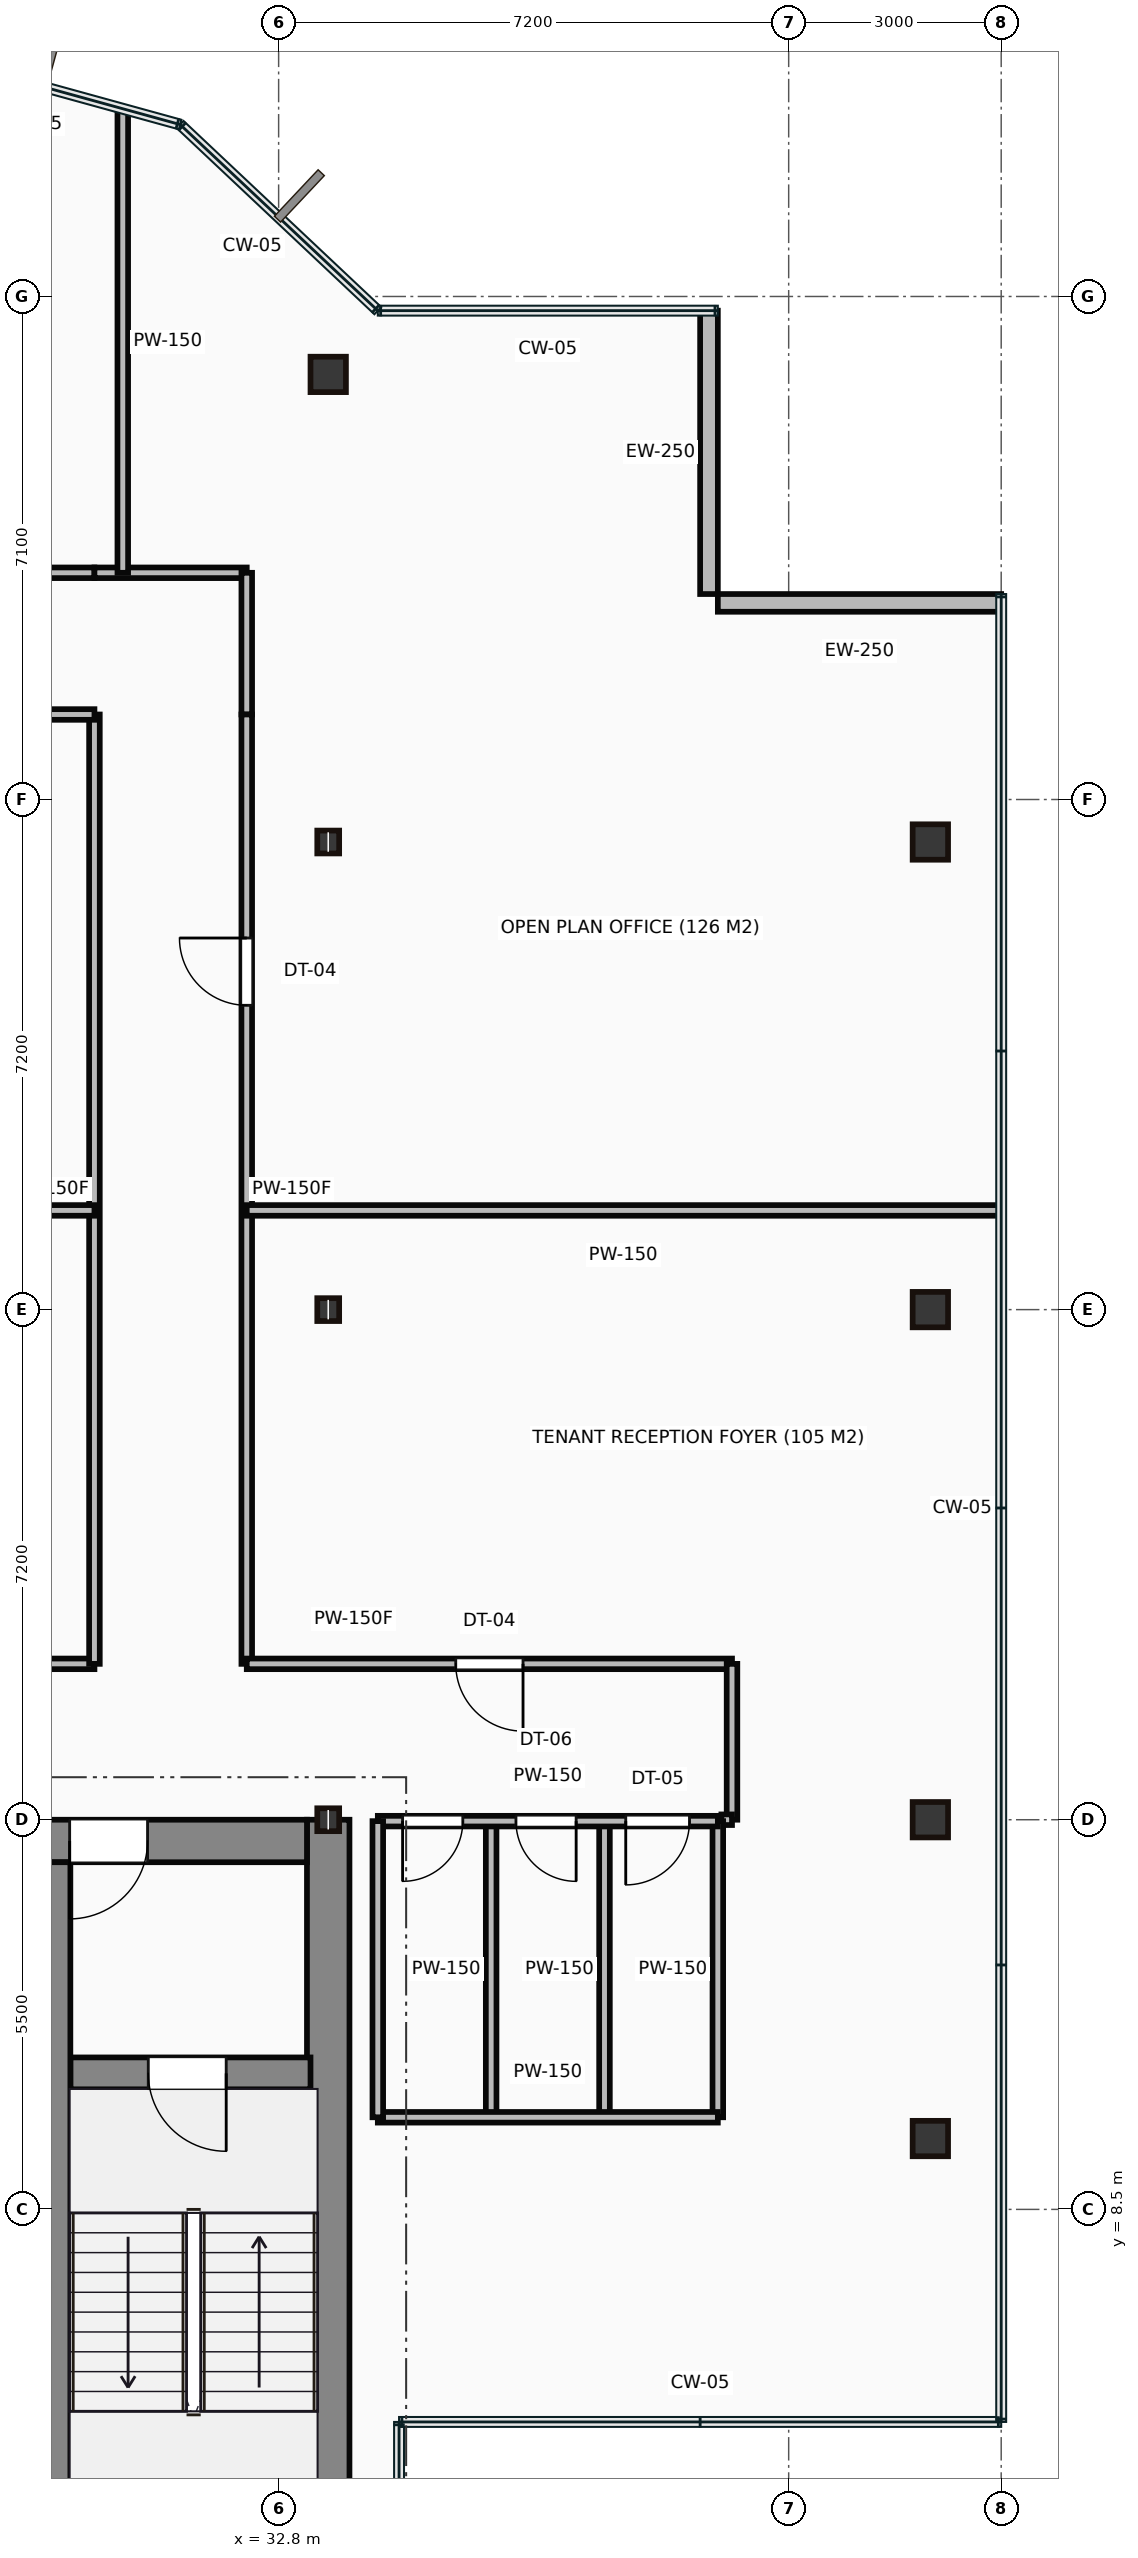
"""IFC4 building model, lengths in metres.
Left out: names, types, materials, properties, quantities, classifications, styles, units other than length and angle.
Written with IfcOpenShell. Run it as: python <this file> out.ifc"""

import sys

from ifc_helpers import new_model, si_unit, direction, frame, frame_2d, origin, origin_2d, place, context, subcontext, project, spatial, rectangle, hollow_rectangle, i_section, extrude, source, transform, mapped, element, fill, save


model = new_model("IFC4")
c1 = context("Model", 3, precision=1e-05, world=origin(), true_north=direction((0.0, 1.0)))
c2 = subcontext(c1, "Body", "Model", "MODEL_VIEW")
j1 = project(units=[si_unit("LENGTHUNIT", "METRE"), si_unit("PLANEANGLEUNIT", "RADIAN")], contexts=[c1])
p1 = place(None, origin())
s1 = spatial("IfcSite", under=j1, at=p1, CompositionType="ELEMENT")
p2 = place(p1, origin())
s2 = spatial("IfcBuilding", under=s1, at=p2, CompositionType="ELEMENT")
p3 = place(p2, frame((0.0, 0.0, 269.75)))
s3 = spatial("IfcBuildingStorey", under=s2, at=p3, CompositionType="ELEMENT", Elevation=269.75)
m1 = source(origin(), c2, "Body", "SweptSolid", [
    extrude(rectangle(XDim=13.1, YDim=0.6, at=frame_2d((6.55, 0.0))), origin(), (0.0, 0.0, 1.0), 3.65),
])
p4 = place(p3, frame((33.5, 0.9, 0.0), z_axis=(0.0, 0.0, 1.0), x_axis=(0.0, 1.0, 0.0)))
e1 = element("IfcWall", 1, at=p4, inside=s3, PredefinedType="SHEAR", context=c2, shape_type="MappedRepresentation", body=[
    mapped(m1, transform((0.0, 0.0, 0.0))),
])
m2 = source(origin(), c2, "Body", "SweptSolid", [
    extrude(rectangle(XDim=12.6, YDim=0.6, at=frame_2d((6.3, 0.0))), origin(), (0.0, 0.0, 1.0), 3.65),
])
p5 = place(p3, frame((20.6, 13.7, 0.0), z_axis=(0.0, 0.0, 1.0), x_axis=(1.0, 0.0, 0.0)))
e2 = element("IfcWall", 2, at=p5, inside=s3, PredefinedType="SHEAR", context=c2, shape_type="MappedRepresentation", body=[
    mapped(m2, transform((0.0, 0.0, 0.0))),
])
p6 = place(p5, frame((9.25, 0.0, 0.0)))
e3 = element("IfcOpeningElement", 3, at=p6, cuts=e2, PredefinedType="OPENING", context=c2, shape_type="SweptSolid", body=[
    extrude(rectangle(XDim=1.1, YDim=2.15, at=frame_2d((0.55, 1.075))), frame((0.0, 0.31, 0.0), z_axis=(0.0, -1.0, 0.0), x_axis=(1.0, 0.0, 0.0)), (0.0, 0.0, 1.0), 0.62),
])
m3 = source(origin(), c2, "Body", "SweptSolid", [
    extrude(rectangle(XDim=12.5, YDim=0.45, at=frame_2d((6.25, 0.0))), origin(), (0.0, 0.0, 1.0), 3.65),
])
p7 = place(p3, frame((29.635, 0.9, 0.0), z_axis=(0.0, 0.0, 1.0), x_axis=(0.0, 1.0, 0.0)))
e4 = element("IfcWall", 4, at=p7, inside=s3, PredefinedType="SHEAR", context=c2, shape_type="MappedRepresentation", body=[
    mapped(m3, transform((0.0, 0.0, 0.0))),
])
m4 = source(origin(), c2, "Body", "SweptSolid", [
    extrude(rectangle(XDim=3.39, YDim=0.45, at=frame_2d((1.695, 0.0))), origin(), (0.0, 0.0, 1.0), 3.65),
])
p8 = place(p3, frame((29.86, 10.42, 0.0), z_axis=(0.0, 0.0, 1.0), x_axis=(1.0, 0.0, 0.0)))
e5 = element("IfcWall", 5, at=p8, inside=s3, PredefinedType="SHEAR", context=c2, shape_type="MappedRepresentation", body=[
    mapped(m4, transform((0.0, 0.0, 0.0))),
])
p9 = place(p8, frame((1.1, 0.0, 0.0)))
e6 = element("IfcOpeningElement", 6, at=p9, cuts=e5, PredefinedType="OPENING", context=c2, shape_type="SweptSolid", body=[
    extrude(rectangle(XDim=1.1, YDim=2.15, at=frame_2d((0.55, 1.075))), frame((0.0, 0.235, 0.0), z_axis=(0.0, -1.0, 0.0), x_axis=(1.0, 0.0, 0.0)), (0.0, 0.0, 1.0), 0.47),
])
m5 = source(origin(), c2, "Body", "SweptSolid", [
    extrude(i_section(OverallWidth=0.309, OverallDepth=0.323, WebThickness=0.014, FlangeThickness=0.023, at=origin_2d()), origin(), (0.0, 0.0, 1.0), 3.65),
])
for number, where, z_axis, x_axis in (
    (7, (33.5, 14.0, 0.0), (0.0, 0.0, 1.0), (1.0, 0.0, 0.0)),
    (8, (33.5, 21.2, 0.0), (0.0, 0.0, 1.0), (1.0, 0.0, 0.0)),
    (9, (33.5, 27.8, 0.0), (0.0, 0.0, 1.0), (1.0, 0.0, 0.0)),
):
    element("IfcColumn", number, at=place(p3, frame(where, z_axis=z_axis, x_axis=x_axis)), inside=s3, PredefinedType="COLUMN", context=c2, shape_type="MappedRepresentation", body=[
        mapped(m5, transform((0.0, 0.0, 0.0))),
    ])
m6 = source(origin(), c2, "Body", "SweptSolid", [
    extrude(hollow_rectangle(XDim=0.5, YDim=0.5, WallThickness=0.022, at=origin_2d()), origin(), (0.0, 0.0, 1.0), 3.65),
])
for number, where, z_axis, x_axis in (
    (10, (33.5, 34.4, 0.0), (0.0, 0.0, 1.0), (1.0, 0.0, 0.0)),
    (11, (42.0, 9.5, 0.0), (0.0, 0.0, 1.0), (1.0, 0.0, 0.0)),
    (12, (42.0, 14.0, 0.0), (0.0, 0.0, 1.0), (1.0, 0.0, 0.0)),
    (13, (42.0, 21.2, 0.0), (0.0, 0.0, 1.0), (1.0, 0.0, 0.0)),
    (14, (42.0, 27.8, 0.0), (0.0, 0.0, 1.0), (1.0, 0.0, 0.0)),
):
    element("IfcColumn", number, at=place(p3, frame(where, z_axis=z_axis, x_axis=x_axis)), inside=s3, PredefinedType="COLUMN", context=c2, shape_type="MappedRepresentation", body=[
        mapped(m6, transform((0.0, 0.0, 0.0))),
    ])
m7 = source(origin(), c2, "Body", "SweptSolid", [
    extrude(rectangle(XDim=4.0, YDim=0.25, at=frame_2d((2.0, 0.0))), origin(), (0.0, 0.0, 1.0), 3.4),
])
for number, where, z_axis, x_axis in (
    (15, (43.0, 31.175, 0.0), (0.0, 0.0, 1.0), (-1.0, 0.0, 0.0)),
    (16, (38.875, 31.3, 0.0), (0.0, 0.0, 1.0), (0.0, 1.0, 0.0)),
):
    element("IfcWall", number, at=place(p3, frame(where, z_axis=z_axis, x_axis=x_axis)), inside=s3, PredefinedType="STANDARD", context=c2, shape_type="MappedRepresentation", body=[
        mapped(m7, transform((0.0, 0.0, 0.0))),
    ])
m8 = source(origin(), c2, "Body", "SweptSolid", [
    extrude(rectangle(XDim=4.8, YDim=0.15, at=frame_2d((2.4, 0.0))), origin(), (0.0, 0.0, 1.0), 2.787),
])
p10 = place(p3, frame((34.2, 13.98, 0.0), z_axis=(0.0, 0.0, 1.0), x_axis=(1.0, 0.0, 0.0)))
e17 = element("IfcWall", 17, at=p10, inside=s3, PredefinedType="PARTITIONING", context=c2, shape_type="MappedRepresentation", body=[
    mapped(m8, transform((0.0, 0.0, 0.0))),
])
p11 = place(p10, frame((0.35, 0.0, 0.0)))
e18 = element("IfcOpeningElement", 18, at=p11, cuts=e17, PredefinedType="OPENING", context=c2, shape_type="SweptSolid", body=[
    extrude(rectangle(XDim=0.85, YDim=2.1, at=frame_2d((0.425, 1.05))), frame((0.0, 0.085, 0.0), z_axis=(0.0, -1.0, 0.0), x_axis=(1.0, 0.0, 0.0)), (0.0, 0.0, 1.0), 0.17),
])
p12 = place(p10, frame((1.95, 0.0, 0.0)))
e19 = element("IfcOpeningElement", 19, at=p12, cuts=e17, PredefinedType="OPENING", context=c2, shape_type="SweptSolid", body=[
    extrude(rectangle(XDim=0.85, YDim=2.1, at=frame_2d((0.425, 1.05))), frame((0.0, 0.085, 0.0), z_axis=(0.0, -1.0, 0.0), x_axis=(1.0, 0.0, 0.0)), (0.0, 0.0, 1.0), 0.17),
])
p13 = place(p10, frame((3.5, 0.0, 0.0)))
e20 = element("IfcOpeningElement", 20, at=p13, cuts=e17, PredefinedType="OPENING", context=c2, shape_type="SweptSolid", body=[
    extrude(rectangle(XDim=0.9, YDim=2.1, at=frame_2d((0.45, 1.05))), frame((0.0, 0.085, 0.0), z_axis=(0.0, -1.0, 0.0), x_axis=(1.0, 0.0, 0.0)), (0.0, 0.0, 1.0), 0.17),
])
m9 = source(origin(), c2, "Body", "SweptSolid", [
    extrude(rectangle(XDim=4.8, YDim=0.15, at=frame_2d((2.4, 0.0))), origin(), (0.0, 0.0, 1.0), 3.4),
])
p14 = place(p3, frame((34.2, 9.8, 0.0), z_axis=(0.0, 0.0, 1.0), x_axis=(1.0, 0.0, 0.0)))
e21 = element("IfcWall", 21, at=p14, inside=s3, PredefinedType="PARTITIONING", context=c2, shape_type="MappedRepresentation", body=[
    mapped(m9, transform((0.0, 0.0, 0.0))),
])
m10 = source(origin(), c2, "Body", "SweptSolid", [
    extrude(rectangle(XDim=4.18, YDim=0.15, at=frame_2d((2.09, 0.0))), origin(), (0.0, 0.0, 1.0), 3.4),
])
for number, where, z_axis, x_axis in (
    (22, (39.0, 9.8, 0.0), (0.0, 0.0, 1.0), (0.0, 1.0, 0.0)),
    (23, (34.2, 9.8, 0.0), (0.0, 0.0, 1.0), (0.0, 1.0, 0.0)),
    (24, (35.8, 9.8, 0.0), (0.0, 0.0, 1.0), (0.0, 1.0, 0.0)),
    (25, (37.4, 9.8, 0.0), (0.0, 0.0, 1.0), (0.0, 1.0, 0.0)),
):
    element("IfcWall", number, at=place(p3, frame(where, z_axis=z_axis, x_axis=x_axis)), inside=s3, PredefinedType="PARTITIONING", context=c2, shape_type="MappedRepresentation", body=[
        mapped(m10, transform((0.0, 0.0, 0.0))),
    ])
m11 = source(origin(), c2, "Body", "SweptSolid", [
    extrude(rectangle(XDim=11.25, YDim=0.15, at=frame_2d((5.625, 0.0))), origin(), (0.0, 0.0, 1.0), 3.4),
])
p15 = place(p3, frame((18.95, 31.6, 0.0), z_axis=(0.0, 0.0, 1.0), x_axis=(1.0, 0.0, 0.0)))
e26 = element("IfcWall", 26, at=p15, inside=s3, PredefinedType="PARTITIONING", context=c2, shape_type="MappedRepresentation", body=[
    mapped(m11, transform((0.0, 0.0, 0.0))),
])
p16 = place(p15, frame((5.445, 0.0, 0.0)))
e27 = element("IfcOpeningElement", 27, at=p16, cuts=e26, PredefinedType="OPENING", context=c2, shape_type="SweptSolid", body=[
    extrude(rectangle(XDim=0.95, YDim=2.15, at=frame_2d((0.475, 1.075))), frame((0.0, 0.085, 0.0), z_axis=(0.0, -1.0, 0.0), x_axis=(1.0, 0.0, 0.0)), (0.0, 0.0, 1.0), 0.17),
])
m12 = source(origin(), c2, "Body", "SweptSolid", [
    extrude(rectangle(XDim=2.15, YDim=0.15, at=frame_2d((1.075, 0.0))), origin(), (0.0, 0.0, 1.0), 3.4),
])
p17 = place(p3, frame((30.2, 31.6, 0.0), z_axis=(0.0, 0.0, 1.0), x_axis=(1.0, 0.0, 0.0)))
e28 = element("IfcWall", 28, at=p17, inside=s3, PredefinedType="PARTITIONING", context=c2, shape_type="MappedRepresentation", body=[
    mapped(m12, transform((0.0, 0.0, 0.0))),
])
m13 = source(origin(), c2, "Body", "SweptSolid", [
    extrude(rectangle(XDim=2.0, YDim=0.15, at=frame_2d((1.0, 0.0))), origin(), (0.0, 0.0, 1.0), 3.4),
])
p18 = place(p3, frame((32.35, 31.6, 0.0), z_axis=(0.0, 0.0, 1.0), x_axis=(0.0, -1.0, 0.0)))
e29 = element("IfcWall", 29, at=p18, inside=s3, PredefinedType="PARTITIONING", context=c2, shape_type="MappedRepresentation", body=[
    mapped(m13, transform((0.0, 0.0, 0.0))),
])
m14 = source(origin(), c2, "Body", "SweptSolid", [
    extrude(rectangle(XDim=13.4, YDim=0.15, at=frame_2d((6.7, 0.0))), origin(), (0.0, 0.0, 1.0), 3.4),
])
p19 = place(p3, frame((32.35, 29.6, 0.0), z_axis=(0.0, 0.0, 1.0), x_axis=(0.0, -1.0, 0.0)))
e30 = element("IfcWall", 30, at=p19, inside=s3, PredefinedType="PARTITIONING", context=c2, shape_type="MappedRepresentation", body=[
    mapped(m14, transform((0.0, 0.0, 0.0))),
])
p20 = place(p19, frame((3.155, 0.0, 0.0)))
e31 = element("IfcOpeningElement", 31, at=p20, cuts=e30, PredefinedType="OPENING", context=c2, shape_type="SweptSolid", body=[
    extrude(rectangle(XDim=0.95, YDim=2.15, at=frame_2d((0.475, 1.075))), frame((0.0, 0.085, 0.0), z_axis=(0.0, -1.0, 0.0), x_axis=(1.0, 0.0, 0.0)), (0.0, 0.0, 1.0), 0.17),
])
m15 = source(origin(), c2, "Body", "SweptSolid", [
    extrude(rectangle(XDim=6.85, YDim=0.15, at=frame_2d((3.425, 0.0))), origin(), (0.0, 0.0, 1.0), 3.4),
])
p21 = place(p3, frame((32.35, 16.2, 0.0), z_axis=(0.0, 0.0, 1.0), x_axis=(1.0, 0.0, 0.0)))
e32 = element("IfcWall", 32, at=p21, inside=s3, PredefinedType="PARTITIONING", context=c2, shape_type="MappedRepresentation", body=[
    mapped(m15, transform((0.0, 0.0, 0.0))),
])
p22 = place(p21, frame((2.95, 0.0, 0.0)))
e33 = element("IfcOpeningElement", 33, at=p22, cuts=e32, PredefinedType="OPENING", context=c2, shape_type="SweptSolid", body=[
    extrude(rectangle(XDim=0.95, YDim=2.15, at=frame_2d((0.475, 1.075))), frame((0.0, 0.085, 0.0), z_axis=(0.0, -1.0, 0.0), x_axis=(1.0, 0.0, 0.0)), (0.0, 0.0, 1.0), 0.17),
])
m16 = source(origin(), c2, "Body", "SweptSolid", [
    extrude(rectangle(XDim=2.2, YDim=0.15, at=frame_2d((1.1, 0.0))), origin(), (0.0, 0.0, 1.0), 3.4),
])
p23 = place(p3, frame((39.2, 16.2, 0.0), z_axis=(0.0, 0.0, 1.0), x_axis=(0.0, -1.0, 0.0)))
e34 = element("IfcWall", 34, at=p23, inside=s3, PredefinedType="PARTITIONING", context=c2, shape_type="MappedRepresentation", body=[
    mapped(m16, transform((0.0, 0.0, 0.0))),
])
m17 = source(origin(), c2, "Body", "SweptSolid", [
    extrude(rectangle(XDim=0.15, YDim=0.15, at=frame_2d((0.075, 0.0))), origin(), (0.0, 0.0, 1.0), 3.4),
])
p24 = place(p3, frame((39.2, 14.0, 0.0), z_axis=(0.0, 0.0, 1.0), x_axis=(-1.0, 0.0, 0.0)))
e35 = element("IfcWall", 35, at=p24, inside=s3, PredefinedType="PARTITIONING", context=c2, shape_type="MappedRepresentation", body=[
    mapped(m17, transform((0.0, 0.0, 0.0))),
])
p25 = place(p3, frame((18.95, 16.2, 0.0), z_axis=(0.0, 0.0, 1.0), x_axis=(1.0, 0.0, 0.0)))
e36 = element("IfcWall", 36, at=p25, inside=s3, PredefinedType="PARTITIONING", context=c2, shape_type="MappedRepresentation", body=[
    mapped(m11, transform((0.0, 0.0, 0.0))),
])
p26 = place(p25, frame((5.15, 0.0, 0.0)))
e37 = element("IfcOpeningElement", 37, at=p26, cuts=e36, PredefinedType="OPENING", context=c2, shape_type="SweptSolid", body=[
    extrude(rectangle(XDim=0.95, YDim=2.15, at=frame_2d((0.475, 1.075))), frame((0.0, 0.085, 0.0), z_axis=(0.0, -1.0, 0.0), x_axis=(1.0, 0.0, 0.0)), (0.0, 0.0, 1.0), 0.17),
])
p27 = place(p3, frame((30.2, 16.2, 0.0), z_axis=(0.0, 0.0, 1.0), x_axis=(0.0, 1.0, 0.0)))
e38 = element("IfcWall", 38, at=p27, inside=s3, PredefinedType="PARTITIONING", context=c2, shape_type="MappedRepresentation", body=[
    mapped(m14, transform((0.0, 0.0, 0.0))),
])
p28 = place(p3, frame((30.2, 29.6, 0.0), z_axis=(0.0, 0.0, 1.0), x_axis=(-1.0, 0.0, 0.0)))
e39 = element("IfcWall", 39, at=p28, inside=s3, PredefinedType="PARTITIONING", context=c2, shape_type="MappedRepresentation", body=[
    mapped(m11, transform((0.0, 0.0, 0.0))),
])
p29 = place(p28, frame((5.15, 0.0, 0.0)))
e40 = element("IfcOpeningElement", 40, at=p29, cuts=e39, PredefinedType="OPENING", context=c2, shape_type="SweptSolid", body=[
    extrude(rectangle(XDim=0.95, YDim=2.15, at=frame_2d((0.475, 1.075))), frame((0.0, 0.085, 0.0), z_axis=(0.0, -1.0, 0.0), x_axis=(1.0, 0.0, 0.0)), (0.0, 0.0, 1.0), 0.17),
])
m18 = source(origin(), c2, "Body", "SweptSolid", [
    extrude(rectangle(XDim=10.4, YDim=0.15, at=frame_2d((5.2, 0.0))), origin(), (0.0, 0.0, 1.0), 3.4),
])
p30 = place(p3, frame((19.8, 22.6, 0.0), z_axis=(0.0, 0.0, 1.0), x_axis=(1.0, 0.0, 0.0)))
e41 = element("IfcWall", 41, at=p30, inside=s3, PredefinedType="PARTITIONING", context=c2, shape_type="MappedRepresentation", body=[
    mapped(m18, transform((0.0, 0.0, 0.0))),
])
m19 = source(origin(), c2, "Body", "SweptSolid", [
    extrude(rectangle(XDim=6.529, YDim=0.15, at=frame_2d((3.265, 0.0))), origin(), (0.0, 0.0, 1.0), 3.4),
])
p31 = place(p3, frame((30.6, 38.129, 0.0), z_axis=(0.0, 0.0, 1.0), x_axis=(0.0, -1.0, 0.0)))
e42 = element("IfcWall", 42, at=p31, inside=s3, PredefinedType="PARTITIONING", context=c2, shape_type="MappedRepresentation", body=[
    mapped(m19, transform((0.0, 0.0, 0.0))),
])
m20 = source(origin(), c2, "Body", "SweptSolid", [
    extrude(rectangle(XDim=10.63, YDim=0.15, at=frame_2d((5.315, 0.0))), origin(), (0.0, 0.0, 1.0), 3.4),
])
p32 = place(p3, frame((42.98, 22.6, 0.0), z_axis=(0.0, 0.0, 1.0), x_axis=(-1.0, 0.0, 0.0)))
e43 = element("IfcWall", 43, at=p32, inside=s3, PredefinedType="PARTITIONING", context=c2, shape_type="MappedRepresentation", body=[
    mapped(m20, transform((0.0, 0.0, 0.0))),
])
m21 = source(origin(), c2, "Body", "SweptSolid", [
    extrude(rectangle(XDim=1.1, YDim=2.15, at=frame_2d((0.55, 1.075))), frame((0.0, 0.025, 0.0), z_axis=(0.0, -1.0, 0.0), x_axis=(1.0, 0.0, 0.0)), (0.0, 0.0, 1.0), 0.05),
])
p33 = place(p9, frame((1.1, 0.0, 0.0), z_axis=(0.0, 0.0, 1.0), x_axis=(-1.0, 0.0, 0.0)))
e44 = element("IfcDoor", 44, at=p33, inside=s3, OperationType="SINGLE_SWING_RIGHT", PredefinedType="DOOR", context=c2, shape_type="MappedRepresentation", body=[
    mapped(m21, transform((0.0, 0.0, 0.0))),
])
fill(e6, e44)
p34 = place(p6, origin())
e45 = element("IfcDoor", 45, at=p34, inside=s3, OperationType="SINGLE_SWING_LEFT", PredefinedType="DOOR", context=c2, shape_type="MappedRepresentation", body=[
    mapped(m21, transform((0.0, 0.0, 0.0))),
])
fill(e3, e45)
m22 = source(origin(), c2, "Body", "SweptSolid", [
    extrude(rectangle(XDim=0.85, YDim=2.1, at=frame_2d((0.425, 1.05))), frame((0.0, 0.025, 0.0), z_axis=(0.0, -1.0, 0.0), x_axis=(1.0, 0.0, 0.0)), (0.0, 0.0, 1.0), 0.05),
])
p35 = place(p11, frame((0.85, 0.0, 0.0), z_axis=(0.0, 0.0, 1.0), x_axis=(-1.0, 0.0, 0.0)))
e46 = element("IfcDoor", 46, at=p35, inside=s3, OperationType="SINGLE_SWING_LEFT", PredefinedType="DOOR", context=c2, shape_type="MappedRepresentation", body=[
    mapped(m22, transform((0.0, 0.0, 0.0))),
])
fill(e18, e46)
p36 = place(p12, frame((0.85, 0.0, 0.0), z_axis=(0.0, 0.0, 1.0), x_axis=(-1.0, 0.0, 0.0)))
e47 = element("IfcDoor", 47, at=p36, inside=s3, OperationType="SINGLE_SWING_RIGHT", PredefinedType="DOOR", context=c2, shape_type="MappedRepresentation", body=[
    mapped(m22, transform((0.0, 0.0, 0.0))),
])
fill(e19, e47)
m23 = source(origin(), c2, "Body", "SweptSolid", [
    extrude(rectangle(XDim=0.9, YDim=2.1, at=frame_2d((0.45, 1.05))), frame((0.0, 0.025, 0.0), z_axis=(0.0, -1.0, 0.0), x_axis=(1.0, 0.0, 0.0)), (0.0, 0.0, 1.0), 0.05),
])
p37 = place(p13, frame((0.9, 0.0, 0.0), z_axis=(0.0, 0.0, 1.0), x_axis=(-1.0, 0.0, 0.0)))
e48 = element("IfcDoor", 48, at=p37, inside=s3, OperationType="SINGLE_SWING_LEFT", PredefinedType="DOOR", context=c2, shape_type="MappedRepresentation", body=[
    mapped(m23, transform((0.0, 0.0, 0.0))),
])
fill(e20, e48)
m24 = source(origin(), c2, "Body", "SweptSolid", [
    extrude(rectangle(XDim=0.95, YDim=2.15, at=frame_2d((0.475, 1.075))), frame((0.0, 0.025, 0.0), z_axis=(0.0, -1.0, 0.0), x_axis=(1.0, 0.0, 0.0)), (0.0, 0.0, 1.0), 0.05),
])
p38 = place(p20, origin())
e49 = element("IfcDoor", 49, at=p38, inside=s3, OperationType="SINGLE_SWING_LEFT", PredefinedType="DOOR", context=c2, shape_type="MappedRepresentation", body=[
    mapped(m24, transform((0.0, 0.0, 0.0))),
])
fill(e31, e49)
p39 = place(p22, origin())
e50 = element("IfcDoor", 50, at=p39, inside=s3, OperationType="SINGLE_SWING_RIGHT", PredefinedType="DOOR", context=c2, shape_type="MappedRepresentation", body=[
    mapped(m24, transform((0.0, 0.0, 0.0))),
])
fill(e33, e50)
save(model, sys.argv[1])
